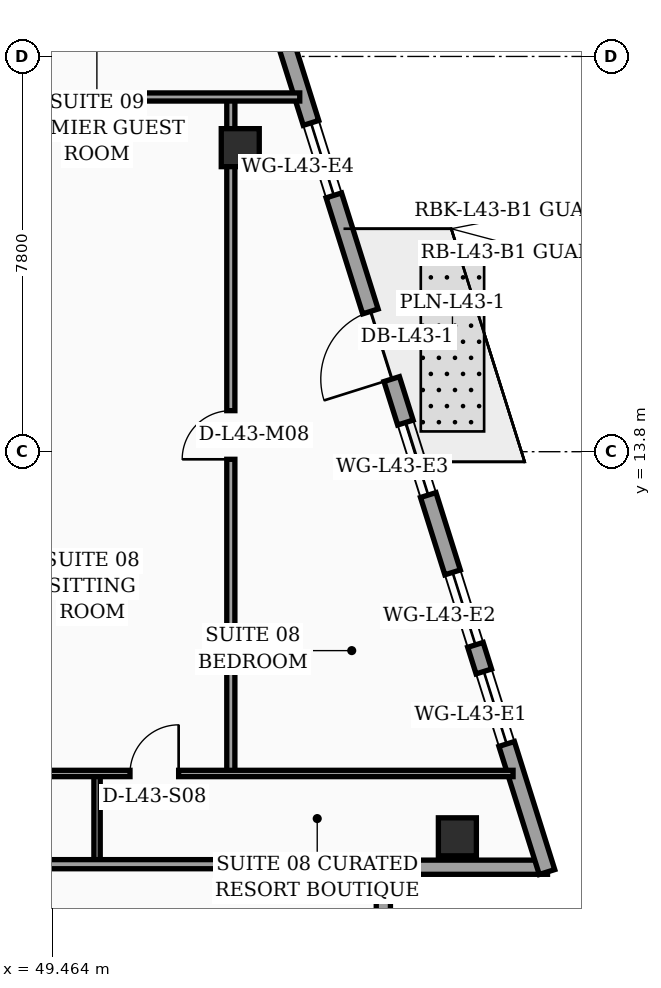
"""IFC4 building model, lengths in metres.
Left out: names, types, materials, properties, quantities, classifications, styles, units other than length and angle.
Written with IfcOpenShell. Run it as: python <this file> out.ifc"""

import sys

from ifc_helpers import new_model, si_unit, direction, frame, frame_2d, origin, origin_2d, place, context, subcontext, project, spatial, rectangle, hollow_rectangle, extrude, element, fill, save


model = new_model("IFC4")
c1 = context("Model", 3, precision=1e-05, world=origin(), true_north=direction((0.0, 1.0)))
c2 = subcontext(c1, "Body", "Model", "MODEL_VIEW")
j1 = project(units=[si_unit("LENGTHUNIT", "METRE"), si_unit("PLANEANGLEUNIT", "RADIAN")], contexts=[c1])
p1 = place(None, origin())
s1 = spatial("IfcSite", under=j1, at=p1, CompositionType="ELEMENT")
p2 = place(p1, origin())
s2 = spatial("IfcBuilding", under=s1, at=p2, CompositionType="ELEMENT")
p3 = place(p2, frame((0.0, 0.0, 175.1)))
s3 = spatial("IfcBuildingStorey", under=s2, at=p3, CompositionType="ELEMENT", Elevation=175.1)
for number, where, z_axis, x_axis in (
    (1, (57.461, 6.2, 0.0), (0.0, 0.0, 1.0), (1.0, 0.0, 0.0)),
    (2, (53.176, 19.8, 0.0), (0.0, 0.0, 1.0), (1.0, 0.0, 0.0)),
):
    element("IfcColumn", number, at=place(p3, frame(where, z_axis=z_axis, x_axis=x_axis)), inside=s3, PredefinedType="COLUMN", context=c2, shape_type="SweptSolid", body=[
        extrude(hollow_rectangle(XDim=0.75, YDim=0.75, WallThickness=0.032, at=origin_2d()), origin(), (0.0, 0.0, 1.0), 3.56),
    ])
p4 = place(p3, frame((56.0, 2.52, 0.0), z_axis=(0.0, 0.0, 1.0), x_axis=(0.0, 1.0, 0.0)))
e3 = element("IfcWall", 3, at=p4, inside=s3, PredefinedType="SOLIDWALL", context=c2, shape_type="SweptSolid", body=[
    extrude(rectangle(XDim=2.94, YDim=0.28, at=frame_2d((1.47, 0.0))), origin(), (0.0, 0.0, 1.0), 3.04),
])
p5 = place(p3, frame((55.86, 5.6, 0.0), z_axis=(0.0, 0.0, 1.0), x_axis=(1.0, 0.0, 0.0)))
e4 = element("IfcWall", 4, at=p5, inside=s3, PredefinedType="SOLIDWALL", context=c2, shape_type="SweptSolid", body=[
    extrude(rectangle(XDim=3.38, YDim=0.28, at=frame_2d((1.69, 0.0))), origin(), (0.0, 0.0, 1.0), 3.04),
])
p6 = place(p3, frame((59.23, 5.505, 0.0), z_axis=(0.0, 0.0, 1.0), x_axis=(-0.300509063924, 0.953778958931, 0.0)))
e5 = element("IfcWall", 5, at=p6, inside=s3, PredefinedType="SOLIDWALL", context=c2, shape_type="SweptSolid", body=[
    extrude(rectangle(XDim=30.814, YDim=0.32, at=frame_2d((15.407, 0.0))), origin(), (0.0, 0.0, 1.0), 3.56),
])
p7 = place(p6, frame((10.199, 0.0, 0.0)))
e6 = element("IfcOpeningElement", 6, at=p7, cuts=e5, PredefinedType="OPENING", context=c2, shape_type="SweptSolid", body=[
    extrude(rectangle(XDim=1.4, YDim=2.25, at=frame_2d((0.7, 1.125))), frame((0.0, 0.17, 0.0), z_axis=(0.0, -1.0, 0.0), x_axis=(1.0, 0.0, 0.0)), (0.0, 0.0, 1.0), 0.34),
])
p8 = place(p6, frame((2.65, 0.0, 0.75)))
e7 = element("IfcOpeningElement", 7, at=p8, cuts=e5, PredefinedType="OPENING", context=c2, shape_type="SweptSolid", body=[
    extrude(rectangle(XDim=1.5, YDim=1.6, at=frame_2d((0.75, 0.8))), frame((0.0, 0.17, 0.0), z_axis=(0.0, -1.0, 0.0), x_axis=(1.0, 0.0, 0.0)), (0.0, 0.0, 1.0), 0.34),
])
p9 = place(p6, frame((4.7, 0.0, 0.75)))
e8 = element("IfcOpeningElement", 8, at=p9, cuts=e5, PredefinedType="OPENING", context=c2, shape_type="SweptSolid", body=[
    extrude(rectangle(XDim=1.5, YDim=1.6, at=frame_2d((0.75, 0.8))), frame((0.0, 0.17, 0.0), z_axis=(0.0, -1.0, 0.0), x_axis=(1.0, 0.0, 0.0)), (0.0, 0.0, 1.0), 0.34),
])
p10 = place(p6, frame((7.8, 0.0, 0.75)))
e9 = element("IfcOpeningElement", 9, at=p10, cuts=e5, PredefinedType="OPENING", context=c2, shape_type="SweptSolid", body=[
    extrude(rectangle(XDim=1.5, YDim=1.6, at=frame_2d((0.75, 0.8))), frame((0.0, 0.17, 0.0), z_axis=(0.0, -1.0, 0.0), x_axis=(1.0, 0.0, 0.0)), (0.0, 0.0, 1.0), 0.34),
])
p11 = place(p6, frame((14.0, 0.0, 0.75)))
e10 = element("IfcOpeningElement", 10, at=p11, cuts=e5, PredefinedType="OPENING", context=c2, shape_type="SweptSolid", body=[
    extrude(rectangle(XDim=1.5, YDim=1.6, at=frame_2d((0.75, 0.8))), frame((0.0, 0.17, 0.0), z_axis=(0.0, -1.0, 0.0), x_axis=(1.0, 0.0, 0.0)), (0.0, 0.0, 1.0), 0.34),
])
p12 = place(p6, frame((17.1, 0.0, 0.75)))
e11 = element("IfcOpeningElement", 11, at=p12, cuts=e5, PredefinedType="OPENING", context=c2, shape_type="SweptSolid", body=[
    extrude(rectangle(XDim=1.5, YDim=1.6, at=frame_2d((0.75, 0.8))), frame((0.0, 0.17, 0.0), z_axis=(0.0, -1.0, 0.0), x_axis=(1.0, 0.0, 0.0)), (0.0, 0.0, 1.0), 0.34),
])
p13 = place(p6, frame((20.2, 0.0, 0.75)))
e12 = element("IfcOpeningElement", 12, at=p13, cuts=e5, PredefinedType="OPENING", context=c2, shape_type="SweptSolid", body=[
    extrude(rectangle(XDim=1.5, YDim=1.6, at=frame_2d((0.75, 0.8))), frame((0.0, 0.17, 0.0), z_axis=(0.0, -1.0, 0.0), x_axis=(1.0, 0.0, 0.0)), (0.0, 0.0, 1.0), 0.34),
])
p14 = place(p6, frame((26.4, 0.0, 0.75)))
e13 = element("IfcOpeningElement", 13, at=p14, cuts=e5, PredefinedType="OPENING", context=c2, shape_type="SweptSolid", body=[
    extrude(rectangle(XDim=1.5, YDim=1.6, at=frame_2d((0.75, 0.8))), frame((0.0, 0.17, 0.0), z_axis=(0.0, -1.0, 0.0), x_axis=(1.0, 0.0, 0.0)), (0.0, 0.0, 1.0), 0.34),
])
p15 = place(p3, frame((50.35, 5.66, 0.0), z_axis=(0.0, 0.0, 1.0), x_axis=(0.0, 1.0, 0.0)))
e14 = element("IfcWall", 14, at=p15, inside=s3, PredefinedType="PARTITIONING", context=c2, shape_type="SweptSolid", body=[
    extrude(rectangle(XDim=1.79, YDim=0.125, at=frame_2d((0.895, 0.0))), origin(), (0.0, 0.0, 1.0), 3.56),
])
p16 = place(p3, frame((52.99, 7.45, 0.0), z_axis=(0.0, 0.0, 1.0), x_axis=(0.0, 1.0, 0.0)))
e15 = element("IfcWall", 15, at=p16, inside=s3, PredefinedType="PARTITIONING", context=c2, shape_type="SweptSolid", body=[
    extrude(rectangle(XDim=13.35, YDim=0.16, at=frame_2d((6.675, 0.0))), origin(), (0.0, 0.0, 1.0), 2.94),
])
p17 = place(p16, frame((6.2, 0.0, 0.0)))
e16 = element("IfcOpeningElement", 16, at=p17, cuts=e15, PredefinedType="OPENING", context=c2, shape_type="SweptSolid", body=[
    extrude(rectangle(XDim=0.96, YDim=2.2, at=frame_2d((0.48, 1.1))), frame((0.0, 0.09, 0.0), z_axis=(0.0, -1.0, 0.0), x_axis=(1.0, 0.0, 0.0)), (0.0, 0.0, 1.0), 0.18),
])
p18 = place(p3, frame((47.4, 7.45, 0.0), z_axis=(0.0, 0.0, 1.0), x_axis=(1.0, 0.0, 0.0)))
e17 = element("IfcWall", 17, at=p18, inside=s3, PredefinedType="PARTITIONING", context=c2, shape_type="SweptSolid", body=[
    extrude(rectangle(XDim=11.16, YDim=0.125, at=frame_2d((5.58, 0.0))), origin(), (0.0, 0.0, 1.0), 2.94),
])
p19 = place(p18, frame((0.5, 0.0, 0.0)))
e18 = element("IfcOpeningElement", 18, at=p19, cuts=e17, PredefinedType="OPENING", context=c2, shape_type="SweptSolid", body=[
    extrude(rectangle(XDim=0.9, YDim=2.15, at=frame_2d((0.45, 1.075))), frame((0.0, 0.073, 0.0), z_axis=(0.0, -1.0, 0.0), x_axis=(1.0, 0.0, 0.0)), (0.0, 0.0, 1.0), 0.145),
])
p20 = place(p18, frame((3.6, 0.0, 0.0)))
e19 = element("IfcOpeningElement", 19, at=p20, cuts=e17, PredefinedType="OPENING", context=c2, shape_type="SweptSolid", body=[
    extrude(rectangle(XDim=0.96, YDim=2.2, at=frame_2d((0.48, 1.1))), frame((0.0, 0.073, 0.0), z_axis=(0.0, -1.0, 0.0), x_axis=(1.0, 0.0, 0.0)), (0.0, 0.0, 1.0), 0.145),
])
p21 = place(p3, frame((47.4, 5.66, 0.0), z_axis=(0.0, 0.0, 1.0), x_axis=(1.0, 0.0, 0.0)))
e20 = element("IfcWall", 20, at=p21, inside=s3, PredefinedType="PARTITIONING", context=c2, shape_type="SweptSolid", body=[
    extrude(rectangle(XDim=8.6, YDim=0.18, at=frame_2d((4.3, 0.0))), origin(), (0.0, 0.0, 1.0), 2.94),
])
p22 = place(p3, frame((47.4, 20.8, 0.0), z_axis=(0.0, 0.0, 1.0), x_axis=(1.0, 0.0, 0.0)))
e21 = element("IfcWall", 21, at=p22, inside=s3, PredefinedType="PARTITIONING", context=c2, shape_type="SweptSolid", body=[
    extrude(rectangle(XDim=6.95, YDim=0.16, at=frame_2d((3.475, 0.0))), origin(), (0.0, 0.0, 1.0), 3.04),
])
p23 = place(p7, origin())
e22 = element("IfcDoor", 22, at=p23, inside=s3, OperationType="SINGLE_SWING_LEFT", PredefinedType="DOOR", context=c2, shape_type="SweptSolid", body=[
    extrude(rectangle(XDim=1.4, YDim=2.25, at=frame_2d((0.7, 1.125))), frame((0.0, 0.025, 0.0), z_axis=(0.0, -1.0, 0.0), x_axis=(1.0, 0.0, 0.0)), (0.0, 0.0, 1.0), 0.05),
])
fill(e6, e22)
p24 = place(p8, origin())
e23 = element("IfcWindow", 23, at=p24, inside=s3, PartitioningType="SINGLE_PANEL", PredefinedType="WINDOW", context=c2, shape_type="SweptSolid", body=[
    extrude(rectangle(XDim=1.5, YDim=1.6, at=frame_2d((0.75, 0.8))), frame((0.0, 0.03, 0.0), z_axis=(0.0, -1.0, 0.0), x_axis=(1.0, 0.0, 0.0)), (0.0, 0.0, 1.0), 0.06),
])
fill(e7, e23)
p25 = place(p9, origin())
e24 = element("IfcWindow", 24, at=p25, inside=s3, PartitioningType="SINGLE_PANEL", PredefinedType="WINDOW", context=c2, shape_type="SweptSolid", body=[
    extrude(rectangle(XDim=1.5, YDim=1.6, at=frame_2d((0.75, 0.8))), frame((0.0, 0.03, 0.0), z_axis=(0.0, -1.0, 0.0), x_axis=(1.0, 0.0, 0.0)), (0.0, 0.0, 1.0), 0.06),
])
fill(e8, e24)
p26 = place(p10, origin())
e25 = element("IfcWindow", 25, at=p26, inside=s3, PartitioningType="SINGLE_PANEL", PredefinedType="WINDOW", context=c2, shape_type="SweptSolid", body=[
    extrude(rectangle(XDim=1.5, YDim=1.6, at=frame_2d((0.75, 0.8))), frame((0.0, 0.03, 0.0), z_axis=(0.0, -1.0, 0.0), x_axis=(1.0, 0.0, 0.0)), (0.0, 0.0, 1.0), 0.06),
])
fill(e9, e25)
p27 = place(p11, origin())
e26 = element("IfcWindow", 26, at=p27, inside=s3, PartitioningType="SINGLE_PANEL", PredefinedType="WINDOW", context=c2, shape_type="SweptSolid", body=[
    extrude(rectangle(XDim=1.5, YDim=1.6, at=frame_2d((0.75, 0.8))), frame((0.0, 0.03, 0.0), z_axis=(0.0, -1.0, 0.0), x_axis=(1.0, 0.0, 0.0)), (0.0, 0.0, 1.0), 0.06),
])
fill(e10, e26)
p28 = place(p17, origin())
e27 = element("IfcDoor", 27, at=p28, inside=s3, OperationType="SINGLE_SWING_LEFT", PredefinedType="DOOR", context=c2, shape_type="SweptSolid", body=[
    extrude(rectangle(XDim=0.96, YDim=2.2, at=frame_2d((0.48, 1.1))), frame((0.0, 0.025, 0.0), z_axis=(0.0, -1.0, 0.0), x_axis=(1.0, 0.0, 0.0)), (0.0, 0.0, 1.0), 0.05),
])
fill(e16, e27)
p29 = place(p20, origin())
e28 = element("IfcDoor", 28, at=p29, inside=s3, OperationType="SINGLE_SWING_RIGHT", PredefinedType="DOOR", context=c2, shape_type="SweptSolid", body=[
    extrude(rectangle(XDim=0.96, YDim=2.2, at=frame_2d((0.48, 1.1))), frame((0.0, 0.025, 0.0), z_axis=(0.0, -1.0, 0.0), x_axis=(1.0, 0.0, 0.0)), (0.0, 0.0, 1.0), 0.05),
])
fill(e19, e28)
save(model, sys.argv[1])
